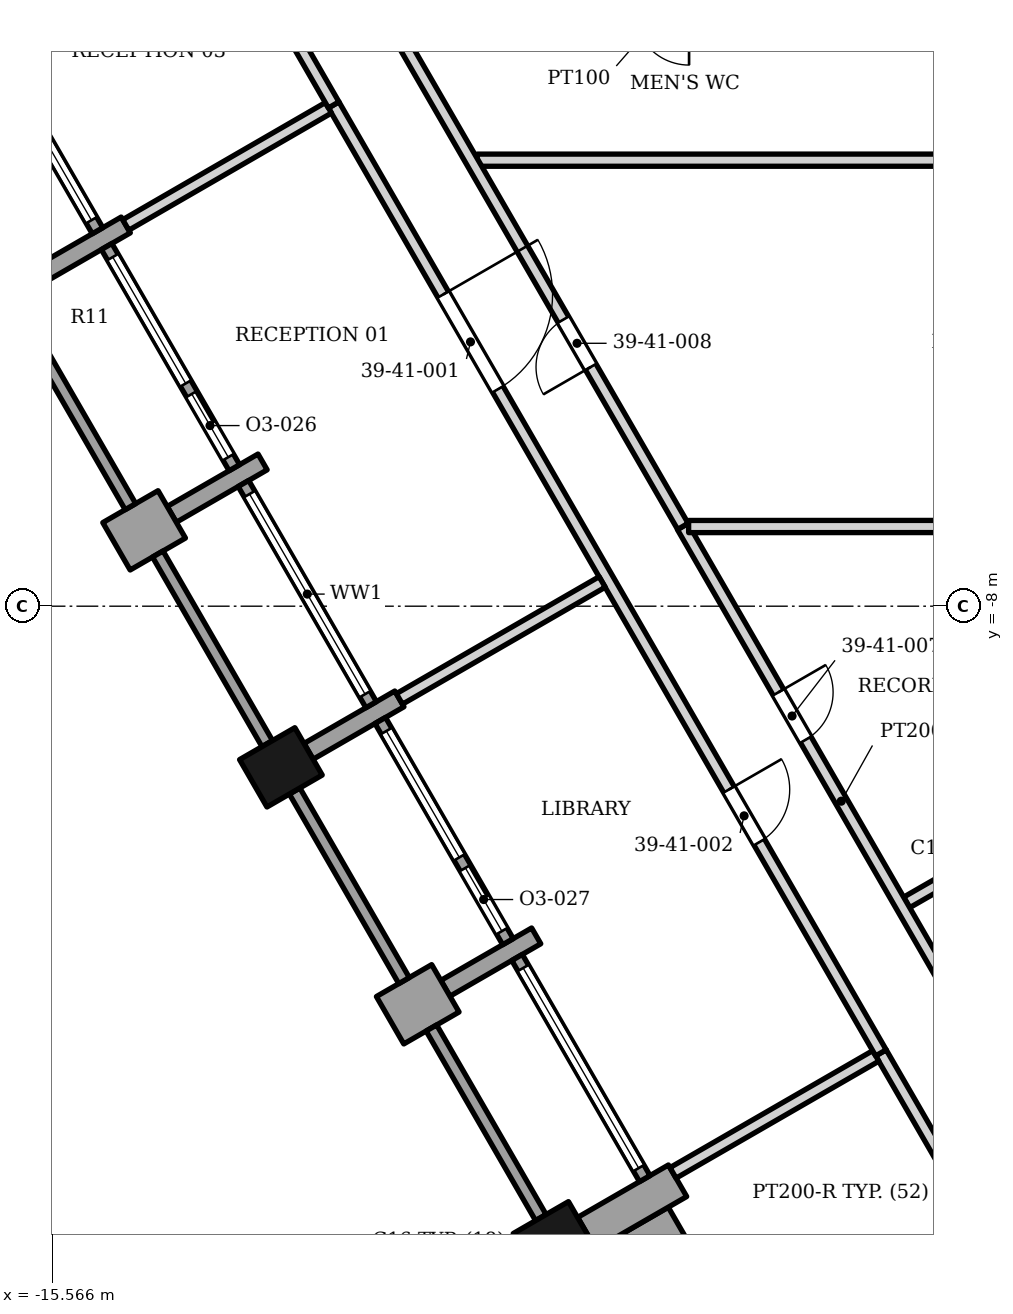
"""IFC4 building model, lengths in metres.
Left out: names, types, materials, properties, quantities, classifications, styles, units other than length and angle.
Written with IfcOpenShell. Run it as: python <this file> out.ifc"""

import sys

from ifc_helpers import new_model, si_unit, direction, frame, frame_2d, origin, origin_2d, place, context, subcontext, project, spatial, rectangle, extrude, element, fill, save


model = new_model("IFC4")
c1 = context("Model", 3, precision=1e-05, world=origin(), true_north=direction((0.0, 1.0)))
c2 = subcontext(c1, "Body", "Model", "MODEL_VIEW")
j1 = project(units=[si_unit("LENGTHUNIT", "METRE"), si_unit("PLANEANGLEUNIT", "RADIAN")], contexts=[c1])
p1 = place(None, origin())
s1 = spatial("IfcSite", under=j1, at=p1, CompositionType="ELEMENT")
p2 = place(p1, origin())
s2 = spatial("IfcBuilding", under=s1, at=p2, CompositionType="ELEMENT")
p3 = place(p2, frame((0.0, 0.0, 168.0)))
s3 = spatial("IfcBuildingStorey", under=s2, at=p3, CompositionType="ELEMENT", Elevation=168.0)
for number, where, z_axis, x_axis in (
    (1, (-11.804, -10.65, 0.0), (0.0, 0.0, 1.0), (0.5, -0.866, 0.0)),
    (2, (-7.304, -18.444, 0.0), (0.0, 0.0, 1.0), (0.5, -0.866, 0.0)),
):
    element("IfcColumn", number, at=place(p3, frame(where, z_axis=z_axis, x_axis=x_axis)), inside=s3, PredefinedType="COLUMN", context=c2, shape_type="SweptSolid", body=[
        extrude(rectangle(XDim=0.9, YDim=1.05, at=origin_2d()), origin(), (0.0, 0.0, 1.0), 3.9),
    ])
p4 = place(p3, frame((-15.848, -2.592, 0.0), z_axis=(0.0, 0.0, 1.0), x_axis=(0.866029956157, 0.499992114976, 0.0)))
e3 = element("IfcWall", 3, at=p4, inside=s3, PredefinedType="SOLIDWALL", context=c2, shape_type="SweptSolid", body=[
    extrude(rectangle(XDim=1.724, YDim=0.3, at=frame_2d((0.862, 0.0))), origin(), (0.0, 0.0, 1.0), 3.0),
])
p5 = place(p3, frame((-14.508, -7.015, 0.0), z_axis=(0.0, 0.0, 1.0), x_axis=(0.866088799389, 0.499890179513, 0.0)))
e4 = element("IfcWall", 4, at=p5, inside=s3, PredefinedType="SOLIDWALL", context=c2, shape_type="SweptSolid", body=[
    extrude(rectangle(XDim=1.05, YDim=0.9, at=frame_2d((0.525, 0.0))), origin(), (0.0, 0.0, 1.0), 3.0),
])
p6 = place(p3, frame((-13.599, -6.49, 0.0), z_axis=(0.0, 0.0, 1.0), x_axis=(0.866013532718, 0.500020560727, 0.0)))
e5 = element("IfcWall", 5, at=p6, inside=s3, PredefinedType="SOLIDWALL", context=c2, shape_type="SweptSolid", body=[
    extrude(rectangle(XDim=1.725, YDim=0.3, at=frame_2d((0.863, 0.0))), origin(), (0.0, 0.0, 1.0), 3.0),
])
p7 = place(p3, frame((-11.349, -10.387, 0.0), z_axis=(0.0, 0.0, 1.0), x_axis=(0.866074815912, 0.499914405916, 0.0)))
e6 = element("IfcWall", 6, at=p7, inside=s3, PredefinedType="SOLIDWALL", context=c2, shape_type="SweptSolid", body=[
    extrude(rectangle(XDim=1.725, YDim=0.3, at=frame_2d((0.862, 0.0))), origin(), (0.0, 0.0, 1.0), 3.0),
])
p8 = place(p3, frame((-10.008, -14.809, 0.0), z_axis=(0.0, 0.0, 1.0), x_axis=(0.866088799389, 0.499890179513, 0.0)))
e7 = element("IfcWall", 7, at=p8, inside=s3, PredefinedType="SOLIDWALL", context=c2, shape_type="SweptSolid", body=[
    extrude(rectangle(XDim=1.05, YDim=0.9, at=frame_2d((0.525, 0.0))), origin(), (0.0, 0.0, 1.0), 3.0),
])
p9 = place(p3, frame((-9.099, -14.284, 0.0), z_axis=(0.0, 0.0, 1.0), x_axis=(0.866013532718, 0.500020560727, 0.0)))
e8 = element("IfcWall", 8, at=p9, inside=s3, PredefinedType="SOLIDWALL", context=c2, shape_type="SweptSolid", body=[
    extrude(rectangle(XDim=1.725, YDim=0.3, at=frame_2d((0.863, 0.0))), origin(), (0.0, 0.0, 1.0), 3.0),
])
p10 = place(p3, frame((-6.774, -18.311, 0.0), z_axis=(0.0, 0.0, 1.0), x_axis=(0.866013532718, 0.500020560727, 0.0)))
e9 = element("IfcWall", 9, at=p10, inside=s3, PredefinedType="SOLIDWALL", context=c2, shape_type="SweptSolid", body=[
    extrude(rectangle(XDim=1.725, YDim=0.6, at=frame_2d((0.863, 0.0))), origin(), (0.0, 0.0, 1.0), 3.0),
])
p11 = place(p3, frame((-16.92, 1.812, 0.0), z_axis=(0.0, 0.0, 1.0), x_axis=(0.500002543286, -0.866023935413, 0.0)))
e10 = element("IfcWall", 10, at=p11, inside=s3, PredefinedType="ELEMENTEDWALL", context=c2, shape_type="SweptSolid", body=[
    extrude(rectangle(XDim=4.2, YDim=0.2, at=frame_2d((2.1, 0.0))), origin(), (0.0, 0.0, 1.0), 3.0),
])
p12 = place(p11, frame((0.2, 0.0, 0.45)))
e11 = element("IfcOpeningElement", 11, at=p12, cuts=e10, PredefinedType="OPENING", context=c2, shape_type="SweptSolid", body=[
    extrude(rectangle(XDim=3.8, YDim=2.25, at=frame_2d((1.9, 1.125))), frame((0.0, 0.11, 0.0), z_axis=(0.0, -1.0, 0.0), x_axis=(1.0, 0.0, 0.0)), (0.0, 0.0, 1.0), 0.22),
])
p13 = place(p3, frame((-16.079, -3.245, 0.0), z_axis=(0.0, 0.0, 1.0), x_axis=(0.500012057535, -0.866018442252, 0.0)))
e12 = element("IfcWall", 12, at=p13, inside=s3, PredefinedType="SOLIDWALL", context=c2, shape_type="SweptSolid", body=[
    extrude(rectangle(XDim=3.6, YDim=0.2, at=frame_2d((1.8, 0.0))), origin(), (0.0, 0.0, 1.0), 3.0),
])
p14 = place(p3, frame((-14.67, -2.085, 0.0), z_axis=(0.0, 0.0, 1.0), x_axis=(0.500027713859, -0.866009402589, 0.0)))
e13 = element("IfcWall", 13, at=p14, inside=s3, PredefinedType="ELEMENTEDWALL", context=c2, shape_type="SweptSolid", body=[
    extrude(rectangle(XDim=4.2, YDim=0.2, at=frame_2d((2.1, 0.0))), origin(), (0.0, 0.0, 1.0), 3.0),
])
p15 = place(p14, frame((0.2, 0.0, 0.45)))
e14 = element("IfcOpeningElement", 14, at=p15, cuts=e13, PredefinedType="OPENING", context=c2, shape_type="SweptSolid", body=[
    extrude(rectangle(XDim=2.4, YDim=2.25, at=frame_2d((1.2, 1.125))), frame((0.0, 0.11, 0.0), z_axis=(0.0, -1.0, 0.0), x_axis=(1.0, 0.0, 0.0)), (0.0, 0.0, 1.0), 0.22),
])
p16 = place(p14, frame((2.8, 0.0, 0.0)))
e15 = element("IfcOpeningElement", 15, at=p16, cuts=e13, PredefinedType="OPENING", context=c2, shape_type="SweptSolid", body=[
    extrude(rectangle(XDim=1.2, YDim=2.7, at=frame_2d((0.6, 1.35))), frame((0.0, 0.11, 0.0), z_axis=(0.0, -1.0, 0.0), x_axis=(1.0, 0.0, 0.0)), (0.0, 0.0, 1.0), 0.22),
])
p17 = place(p3, frame((-13.829, -7.142, 0.0), z_axis=(0.0, 0.0, 1.0), x_axis=(0.500012057535, -0.866018442252, 0.0)))
e16 = element("IfcWall", 16, at=p17, inside=s3, PredefinedType="SOLIDWALL", context=c2, shape_type="SweptSolid", body=[
    extrude(rectangle(XDim=3.6, YDim=0.2, at=frame_2d((1.8, 0.0))), origin(), (0.0, 0.0, 1.0), 3.0),
])
p18 = place(p3, frame((-12.42, -5.982, 0.0), z_axis=(0.0, 0.0, 1.0), x_axis=(0.500027713859, -0.866009402589, 0.0)))
e17 = element("IfcWall", 17, at=p18, inside=s3, PredefinedType="ELEMENTEDWALL", context=c2, shape_type="SweptSolid", body=[
    extrude(rectangle(XDim=4.2, YDim=0.2, at=frame_2d((2.1, 0.0))), origin(), (0.0, 0.0, 1.0), 3.0),
])
p19 = place(p18, frame((0.2, 0.0, 0.45)))
e18 = element("IfcOpeningElement", 18, at=p19, cuts=e17, PredefinedType="OPENING", context=c2, shape_type="SweptSolid", body=[
    extrude(rectangle(XDim=3.8, YDim=2.25, at=frame_2d((1.9, 1.125))), frame((0.0, 0.11, 0.0), z_axis=(0.0, -1.0, 0.0), x_axis=(1.0, 0.0, 0.0)), (0.0, 0.0, 1.0), 0.22),
])
p20 = place(p3, frame((-11.579, -11.039, 0.0), z_axis=(0.0, 0.0, 1.0), x_axis=(0.500012057535, -0.866018442252, 0.0)))
e19 = element("IfcWall", 19, at=p20, inside=s3, PredefinedType="SOLIDWALL", context=c2, shape_type="SweptSolid", body=[
    extrude(rectangle(XDim=3.6, YDim=0.2, at=frame_2d((1.8, 0.0))), origin(), (0.0, 0.0, 1.0), 2.95),
])
p21 = place(p3, frame((-10.17, -9.879, 0.0), z_axis=(0.0, 0.0, 1.0), x_axis=(0.500002543286, -0.866023935413, 0.0)))
e20 = element("IfcWall", 20, at=p21, inside=s3, PredefinedType="ELEMENTEDWALL", context=c2, shape_type="SweptSolid", body=[
    extrude(rectangle(XDim=4.2, YDim=0.2, at=frame_2d((2.1, 0.0))), origin(), (0.0, 0.0, 1.0), 2.95),
])
p22 = place(p21, frame((0.2, 0.0, 0.45)))
e21 = element("IfcOpeningElement", 21, at=p22, cuts=e20, PredefinedType="OPENING", context=c2, shape_type="SweptSolid", body=[
    extrude(rectangle(XDim=2.4, YDim=2.25, at=frame_2d((1.2, 1.125))), frame((0.0, 0.11, 0.0), z_axis=(0.0, -1.0, 0.0), x_axis=(1.0, 0.0, 0.0)), (0.0, 0.0, 1.0), 0.22),
])
p23 = place(p21, frame((2.8, 0.0, 0.0)))
e22 = element("IfcOpeningElement", 22, at=p23, cuts=e20, PredefinedType="OPENING", context=c2, shape_type="SweptSolid", body=[
    extrude(rectangle(XDim=1.2, YDim=2.7, at=frame_2d((0.6, 1.35))), frame((0.0, 0.11, 0.0), z_axis=(0.0, -1.0, 0.0), x_axis=(1.0, 0.0, 0.0)), (0.0, 0.0, 1.0), 0.22),
])
p24 = place(p3, frame((-9.329, -14.936, 0.0), z_axis=(0.0, 0.0, 1.0), x_axis=(0.500012057535, -0.866018442252, 0.0)))
e23 = element("IfcWall", 23, at=p24, inside=s3, PredefinedType="SOLIDWALL", context=c2, shape_type="SweptSolid", body=[
    extrude(rectangle(XDim=3.6, YDim=0.2, at=frame_2d((1.8, 0.0))), origin(), (0.0, 0.0, 1.0), 3.0),
])
p25 = place(p3, frame((-7.92, -13.777, 0.0), z_axis=(0.0, 0.0, 1.0), x_axis=(0.500027713859, -0.866009402589, 0.0)))
e24 = element("IfcWall", 24, at=p25, inside=s3, PredefinedType="ELEMENTEDWALL", context=c2, shape_type="SweptSolid", body=[
    extrude(rectangle(XDim=4.2, YDim=0.2, at=frame_2d((2.1, 0.0))), origin(), (0.0, 0.0, 1.0), 3.0),
])
p26 = place(p25, frame((0.2, 0.0, 0.45)))
e25 = element("IfcOpeningElement", 25, at=p26, cuts=e24, PredefinedType="OPENING", context=c2, shape_type="SweptSolid", body=[
    extrude(rectangle(XDim=3.8, YDim=2.25, at=frame_2d((1.9, 1.125))), frame((0.0, 0.11, 0.0), z_axis=(0.0, -1.0, 0.0), x_axis=(1.0, 0.0, 0.0)), (0.0, 0.0, 1.0), 0.22),
])
p27 = place(p3, frame((-5.154, -18.367, 0.0), z_axis=(0.0, 0.0, 1.0), x_axis=(-0.865997808697, -0.500047793048, 0.0)))
e26 = element("IfcWall", 26, at=p27, inside=s3, PredefinedType="SOLIDWALL", context=c2, shape_type="SweptSolid", body=[
    extrude(rectangle(XDim=2.425, YDim=1.117, at=frame_2d((1.212, 0.0))), origin(), (0.0, 0.0, 1.0), 3.0),
])
p28 = place(p3, frame((-1.936, -15.345, 0.0), z_axis=(0.0, 0.0, 1.0), x_axis=(0.500383446004, -0.865803907918, 0.0)))
e27 = element("IfcWall", 27, at=p28, inside=s3, PredefinedType="PARTITIONING", context=c2, shape_type="SweptSolid", body=[
    extrude(rectangle(XDim=3.804, YDim=0.2, at=frame_2d((1.902, 0.0))), origin(), (0.0, 0.0, 1.0), 3.128),
])
p29 = place(p3, frame((-5.355, -17.319, 0.0), z_axis=(0.0, 0.0, 1.0), x_axis=(0.866214094833, 0.499673035007, 0.0)))
e28 = element("IfcWall", 28, at=p29, inside=s3, PredefinedType="PARTITIONING", context=c2, shape_type="SweptSolid", body=[
    extrude(rectangle(XDim=3.849, YDim=0.2, at=frame_2d((1.925, 0.0))), origin(), (0.0, 0.0, 1.0), 3.128),
])
p30 = place(p3, frame((-10.936, 0.244, 0.0), z_axis=(0.0, 0.0, 1.0), x_axis=(0.5000018851, -0.866024315419, 0.0)))
e29 = element("IfcWall", 29, at=p30, inside=s3, PredefinedType="PARTITIONING", context=c2, shape_type="SweptSolid", body=[
    extrude(rectangle(XDim=18.0, YDim=0.2, at=frame_2d((9.0, 0.0))), origin(), (0.0, 0.0, 1.0), 2.884),
])
p31 = place(p30, frame((3.6, 0.0, 0.0)))
e30 = element("IfcOpeningElement", 30, at=p31, cuts=e29, PredefinedType="OPENING", context=c2, shape_type="SweptSolid", body=[
    extrude(rectangle(XDim=1.8, YDim=2.4, at=frame_2d((0.9, 1.2))), frame((0.0, 0.11, 0.0), z_axis=(0.0, -1.0, 0.0), x_axis=(1.0, 0.0, 0.0)), (0.0, 0.0, 1.0), 0.22),
])
p32 = place(p30, frame((13.0, 0.0, 0.0)))
e31 = element("IfcOpeningElement", 31, at=p32, cuts=e29, PredefinedType="OPENING", context=c2, shape_type="SweptSolid", body=[
    extrude(rectangle(XDim=1.0, YDim=2.4, at=frame_2d((0.5, 1.2))), frame((0.0, 0.11, 0.0), z_axis=(0.0, -1.0, 0.0), x_axis=(1.0, 0.0, 0.0)), (0.0, 0.0, 1.0), 0.22),
])
p33 = place(p3, frame((-1.512, -12.871, 0.0), z_axis=(0.0, 0.0, 1.0), x_axis=(0.866909118008, 0.498466228659, 0.0)))
e32 = element("IfcWall", 32, at=p33, inside=s3, PredefinedType="PARTITIONING", context=c2, shape_type="SweptSolid", body=[
    extrude(rectangle(XDim=0.937, YDim=0.2, at=frame_2d((0.469, 0.0))), origin(), (0.0, 0.0, 1.0), 3.73),
])
p34 = place(p3, frame((-9.855, -9.525, 0.0), z_axis=(0.0, 0.0, 1.0), x_axis=(0.866261590682, 0.499590688974, 0.0)))
e33 = element("IfcWall", 33, at=p34, inside=s3, PredefinedType="PARTITIONING", context=c2, shape_type="SweptSolid", body=[
    extrude(rectangle(XDim=3.85, YDim=0.2, at=frame_2d((1.925, 0.0))), origin(), (0.0, 0.0, 1.0), 3.052),
])
p35 = place(p3, frame((-5.196, -6.69, 0.0), z_axis=(0.0, 0.0, 1.0), x_axis=(0.499990567915, -0.866030849332, 0.0)))
e34 = element("IfcWall", 34, at=p35, inside=s3, PredefinedType="PARTITIONING", context=c2, shape_type="SweptSolid", body=[
    extrude(rectangle(XDim=10.431, YDim=0.2, at=frame_2d((5.215, 0.0))), origin(), (0.0, 0.0, 1.0), 2.884),
])
p36 = place(p35, frame((3.148, 0.0, 0.0)))
e35 = element("IfcOpeningElement", 35, at=p36, cuts=e34, PredefinedType="OPENING", context=c2, shape_type="SweptSolid", body=[
    extrude(rectangle(XDim=0.9, YDim=2.1, at=frame_2d((0.45, 1.05))), frame((0.0, 0.11, 0.0), z_axis=(0.0, -1.0, 0.0), x_axis=(1.0, 0.0, 0.0)), (0.0, 0.0, 1.0), 0.22),
])
p37 = place(p3, frame((-5.098, -6.69, 0.0), z_axis=(0.0, 0.0, 1.0), x_axis=(0.99999998975, 0.000143177586, 0.0)))
e36 = element("IfcWall", 36, at=p37, inside=s3, PredefinedType="PARTITIONING", context=c2, shape_type="SweptSolid", body=[
    extrude(rectangle(XDim=10.231, YDim=0.2, at=frame_2d((5.115, 0.0))), origin(), (0.0, 0.0, 1.0), 3.73),
])
p38 = place(p3, frame((-14.355, -1.73, 0.0), z_axis=(0.0, 0.0, 1.0), x_axis=(0.865832714873, 0.500333598567, 0.0)))
e37 = element("IfcWall", 37, at=p38, inside=s3, PredefinedType="PARTITIONING", context=c2, shape_type="SweptSolid", body=[
    extrude(rectangle(XDim=3.849, YDim=0.2, at=frame_2d((1.925, 0.0))), origin(), (0.0, 0.0, 1.0), 3.052),
])
p39 = place(p3, frame((-8.575, -0.665, 0.0), z_axis=(0.0, 0.0, 1.0), x_axis=(0.999999999483, 3.2155375e-05, 0.0)))
e38 = element("IfcWall", 38, at=p39, inside=s3, PredefinedType="PARTITIONING", context=c2, shape_type="SweptSolid", body=[
    extrude(rectangle(XDim=7.593, YDim=0.2, at=frame_2d((3.796, 0.0))), origin(), (0.0, 0.0, 1.0), 3.73),
])
p40 = place(p3, frame((-12.929, 3.699, 0.0), z_axis=(0.0, 0.0, 1.0), x_axis=(0.499667701935, -0.866217171177, 0.0)))
e39 = element("IfcWall", 39, at=p40, inside=s3, PredefinedType="PARTITIONING", context=c2, shape_type="SweptSolid", body=[
    extrude(rectangle(XDim=3.989, YDim=0.2, at=frame_2d((1.995, 0.0))), origin(), (0.0, 0.0, 1.0), 3.73),
])
p41 = place(p3, frame((-11.198, 3.699, 0.0), z_axis=(0.0, 0.0, 1.0), x_axis=(0.500539648856, -0.865713613109, 0.0)))
e40 = element("IfcWall", 40, at=p41, inside=s3, PredefinedType="PARTITIONING", context=c2, shape_type="SweptSolid", body=[
    extrude(rectangle(XDim=11.997, YDim=0.2, at=frame_2d((5.999, 0.0))), origin(), (0.0, 0.0, 1.0), 3.052),
])
p42 = place(p41, frame((8.07, 0.0, 0.0)))
e41 = element("IfcOpeningElement", 41, at=p42, cuts=e40, PredefinedType="OPENING", context=c2, shape_type="SweptSolid", body=[
    extrude(rectangle(XDim=0.9, YDim=2.1, at=frame_2d((0.45, 1.05))), frame((0.0, 0.11, 0.0), z_axis=(0.0, -1.0, 0.0), x_axis=(1.0, 0.0, 0.0)), (0.0, 0.0, 1.0), 0.22),
])
p43 = place(p12, origin())
e42 = element("IfcWindow", 42, at=p43, inside=s3, PartitioningType="SINGLE_PANEL", PredefinedType="WINDOW", context=c2, shape_type="SweptSolid", body=[
    extrude(rectangle(XDim=3.8, YDim=2.25, at=frame_2d((1.9, 1.125))), frame((0.0, 0.03, 0.0), z_axis=(0.0, -1.0, 0.0), x_axis=(1.0, 0.0, 0.0)), (0.0, 0.0, 1.0), 0.06),
])
fill(e11, e42)
p44 = place(p15, origin())
e43 = element("IfcWindow", 43, at=p44, inside=s3, PartitioningType="SINGLE_PANEL", PredefinedType="WINDOW", context=c2, shape_type="SweptSolid", body=[
    extrude(rectangle(XDim=2.4, YDim=2.25, at=frame_2d((1.2, 1.125))), frame((0.0, 0.03, 0.0), z_axis=(0.0, -1.0, 0.0), x_axis=(1.0, 0.0, 0.0)), (0.0, 0.0, 1.0), 0.06),
])
fill(e14, e43)
p45 = place(p16, origin())
e44 = element("IfcDoor", 44, at=p45, inside=s3, OperationType="SINGLE_SWING_LEFT", PredefinedType="DOOR", context=c2, shape_type="SweptSolid", body=[
    extrude(rectangle(XDim=1.2, YDim=2.7, at=frame_2d((0.6, 1.35))), frame((0.0, 0.025, 0.0), z_axis=(0.0, -1.0, 0.0), x_axis=(1.0, 0.0, 0.0)), (0.0, 0.0, 1.0), 0.05),
])
fill(e15, e44)
p46 = place(p19, origin())
e45 = element("IfcWindow", 45, at=p46, inside=s3, PartitioningType="SINGLE_PANEL", PredefinedType="WINDOW", context=c2, shape_type="SweptSolid", body=[
    extrude(rectangle(XDim=3.8, YDim=2.25, at=frame_2d((1.9, 1.125))), frame((0.0, 0.03, 0.0), z_axis=(0.0, -1.0, 0.0), x_axis=(1.0, 0.0, 0.0)), (0.0, 0.0, 1.0), 0.06),
])
fill(e18, e45)
p47 = place(p22, origin())
e46 = element("IfcWindow", 46, at=p47, inside=s3, PartitioningType="SINGLE_PANEL", PredefinedType="WINDOW", context=c2, shape_type="SweptSolid", body=[
    extrude(rectangle(XDim=2.4, YDim=2.25, at=frame_2d((1.2, 1.125))), frame((0.0, 0.03, 0.0), z_axis=(0.0, -1.0, 0.0), x_axis=(1.0, 0.0, 0.0)), (0.0, 0.0, 1.0), 0.06),
])
fill(e21, e46)
p48 = place(p23, origin())
e47 = element("IfcDoor", 47, at=p48, inside=s3, OperationType="SINGLE_SWING_LEFT", PredefinedType="DOOR", context=c2, shape_type="SweptSolid", body=[
    extrude(rectangle(XDim=1.2, YDim=2.7, at=frame_2d((0.6, 1.35))), frame((0.0, 0.025, 0.0), z_axis=(0.0, -1.0, 0.0), x_axis=(1.0, 0.0, 0.0)), (0.0, 0.0, 1.0), 0.05),
])
fill(e22, e47)
p49 = place(p26, origin())
e48 = element("IfcWindow", 48, at=p49, inside=s3, PartitioningType="SINGLE_PANEL", PredefinedType="WINDOW", context=c2, shape_type="SweptSolid", body=[
    extrude(rectangle(XDim=3.8, YDim=2.25, at=frame_2d((1.9, 1.125))), frame((0.0, 0.03, 0.0), z_axis=(0.0, -1.0, 0.0), x_axis=(1.0, 0.0, 0.0)), (0.0, 0.0, 1.0), 0.06),
])
fill(e25, e48)
p50 = place(p31, origin())
e49 = element("IfcDoor", 49, at=p50, inside=s3, OperationType="DOUBLE_DOOR_SINGLE_SWING", PredefinedType="DOOR", context=c2, shape_type="SweptSolid", body=[
    extrude(rectangle(XDim=1.8, YDim=2.4, at=frame_2d((0.9, 1.2))), frame((0.0, 0.025, 0.0), z_axis=(0.0, -1.0, 0.0), x_axis=(1.0, 0.0, 0.0)), (0.0, 0.0, 1.0), 0.05),
])
fill(e30, e49)
p51 = place(p32, origin())
e50 = element("IfcDoor", 50, at=p51, inside=s3, OperationType="SINGLE_SWING_LEFT", PredefinedType="DOOR", context=c2, shape_type="SweptSolid", body=[
    extrude(rectangle(XDim=1.0, YDim=2.4, at=frame_2d((0.5, 1.2))), frame((0.0, 0.025, 0.0), z_axis=(0.0, -1.0, 0.0), x_axis=(1.0, 0.0, 0.0)), (0.0, 0.0, 1.0), 0.05),
])
fill(e31, e50)
p52 = place(p36, origin())
e51 = element("IfcDoor", 51, at=p52, inside=s3, OperationType="SINGLE_SWING_LEFT", PredefinedType="DOOR", context=c2, shape_type="SweptSolid", body=[
    extrude(rectangle(XDim=0.9, YDim=2.1, at=frame_2d((0.45, 1.05))), frame((0.0, 0.025, 0.0), z_axis=(0.0, -1.0, 0.0), x_axis=(1.0, 0.0, 0.0)), (0.0, 0.0, 1.0), 0.05),
])
fill(e35, e51)
p53 = place(p42, origin())
e52 = element("IfcDoor", 52, at=p53, inside=s3, OperationType="SINGLE_SWING_RIGHT", PredefinedType="DOOR", context=c2, shape_type="SweptSolid", body=[
    extrude(rectangle(XDim=0.9, YDim=2.1, at=frame_2d((0.45, 1.05))), frame((0.0, 0.025, 0.0), z_axis=(0.0, -1.0, 0.0), x_axis=(1.0, 0.0, 0.0)), (0.0, 0.0, 1.0), 0.05),
])
fill(e41, e52)
save(model, sys.argv[1])
